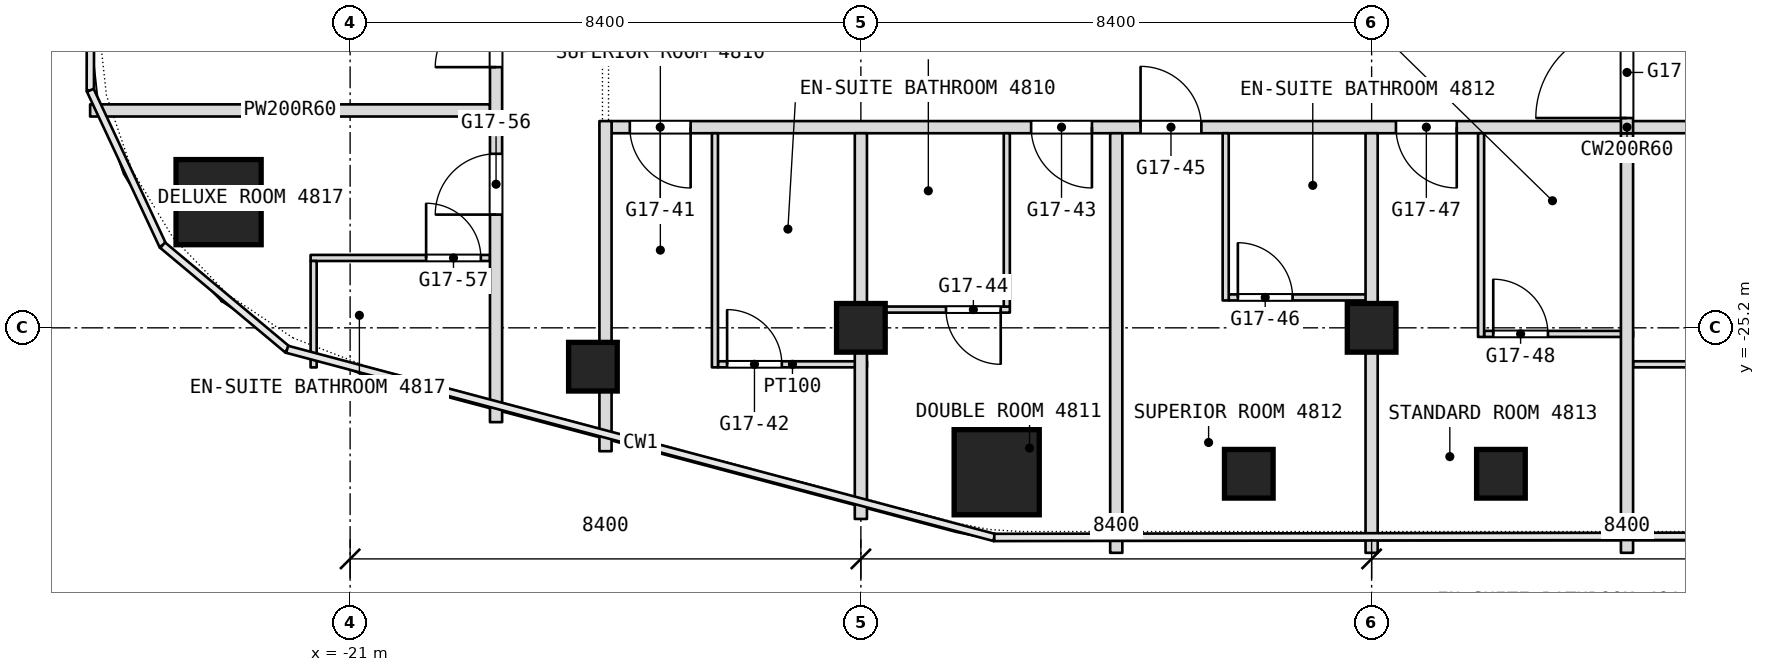
"""IFC4 building model, lengths in metres.
Left out: names, types, materials, properties, quantities, classifications, styles, units other than length and angle.
Written with IfcOpenShell. Run it as: python <this file> out.ifc"""

import sys

from ifc_helpers import new_model, si_unit, direction, frame, frame_2d, origin, origin_2d, place, context, subcontext, project, spatial, rectangle, extrude, element, fill, save


model = new_model("IFC4")
c1 = context("Model", 3, precision=1e-05, world=origin(), true_north=direction((0.0, 1.0)))
c2 = subcontext(c1, "Body", "Model", "MODEL_VIEW")
j1 = project(units=[si_unit("LENGTHUNIT", "METRE"), si_unit("PLANEANGLEUNIT", "RADIAN")], contexts=[c1])
p1 = place(None, origin())
s1 = spatial("IfcSite", under=j1, at=p1, CompositionType="ELEMENT")
p2 = place(p1, origin())
s2 = spatial("IfcBuilding", under=s1, at=p2, CompositionType="ELEMENT")
p3 = place(p2, frame((0.0, 0.0, 209.3)))
s3 = spatial("IfcBuildingStorey", under=s2, at=p3, CompositionType="ELEMENT", Elevation=209.3)
for number, where, z_axis, x_axis in (
    (1, (-23.163, -23.133, 0.0), (0.0, 0.0, 1.0), (1.0, 0.0, 0.0)),
    (2, (-10.366, -27.575, 0.0), (0.0, 0.0, 1.0), (1.0, 0.0, 0.0)),
):
    element("IfcColumn", number, at=place(p3, frame(where, z_axis=z_axis, x_axis=x_axis)), inside=s3, PredefinedType="COLUMN", context=c2, shape_type="SweptSolid", body=[
        extrude(rectangle(XDim=1.4, YDim=1.4, at=origin_2d()), origin(), (0.0, 0.0, 1.0), 3.6),
    ])
for number, where, z_axis, x_axis in (
    (3, (-12.6, -25.2, 0.0), (0.0, 0.0, 1.0), (1.0, 0.0, 0.0)),
    (4, (-4.2, -25.2, 0.0), (0.0, 0.0, 1.0), (1.0, 0.0, 0.0)),
    (5, (-2.073, -27.6, 0.0), (0.0, 0.0, 1.0), (1.0, 0.0, 0.0)),
    (6, (-6.22, -27.6, 0.0), (0.0, 0.0, 1.0), (1.0, 0.0, 0.0)),
    (7, (-17.007, -25.839, 0.0), (0.0, 0.0, 1.0), (1.0, 0.0, 0.0)),
):
    element("IfcColumn", number, at=place(p3, frame(where, z_axis=z_axis, x_axis=x_axis)), inside=s3, PredefinedType="COLUMN", context=c2, shape_type="SweptSolid", body=[
        extrude(rectangle(XDim=0.8, YDim=0.8, at=origin_2d()), origin(), (0.0, 0.0, 1.0), 3.6),
    ])
p4 = place(p3, frame((-14.95, -25.8, 0.0), z_axis=(0.0, 0.0, 1.0), x_axis=(1.0, 0.0, 0.0)))
e8 = element("IfcWall", 8, at=p4, inside=s3, PredefinedType="PARTITIONING", context=c2, shape_type="SweptSolid", body=[
    extrude(rectangle(XDim=2.45, YDim=0.1, at=frame_2d((1.225, 0.0))), origin(), (0.0, 0.0, 1.0), 3.34),
])
p5 = place(p4, frame((0.15, 0.0, 0.0)))
e9 = element("IfcOpeningElement", 9, at=p5, cuts=e8, PredefinedType="OPENING", context=c2, shape_type="SweptSolid", body=[
    extrude(rectangle(XDim=0.9, YDim=2.1, at=frame_2d((0.45, 1.05))), frame((0.0, 0.05, 0.0), z_axis=(0.0, -1.0, 0.0), x_axis=(1.0, 0.0, 0.0)), (0.0, 0.0, 1.0), 0.1),
])
p6 = place(p3, frame((0.1, -25.8, 0.0), z_axis=(0.0, 0.0, 1.0), x_axis=(1.0, 0.0, 0.0)))
e10 = element("IfcWall", 10, at=p6, inside=s3, PredefinedType="PARTITIONING", context=c2, shape_type="SweptSolid", body=[
    extrude(rectangle(XDim=2.35, YDim=0.1, at=frame_2d((1.175, 0.0))), origin(), (0.0, 0.0, 1.0), 3.34),
])
p7 = place(p6, frame((1.3, 0.0, 0.0)))
e11 = element("IfcOpeningElement", 11, at=p7, cuts=e10, PredefinedType="OPENING", context=c2, shape_type="SweptSolid", body=[
    extrude(rectangle(XDim=0.9, YDim=2.1, at=frame_2d((0.45, 1.05))), frame((0.0, 0.05, 0.0), z_axis=(0.0, -1.0, 0.0), x_axis=(1.0, 0.0, 0.0)), (0.0, 0.0, 1.0), 0.1),
])
p8 = place(p3, frame((-2.35, -25.3, 0.0), z_axis=(0.0, 0.0, 1.0), x_axis=(1.0, 0.0, 0.0)))
e12 = element("IfcWall", 12, at=p8, inside=s3, PredefinedType="PARTITIONING", context=c2, shape_type="SweptSolid", body=[
    extrude(rectangle(XDim=2.45, YDim=0.1, at=frame_2d((1.225, 0.0))), origin(), (0.0, 0.0, 1.0), 2.94),
])
p9 = place(p8, frame((0.15, 0.0, 0.0)))
e13 = element("IfcOpeningElement", 13, at=p9, cuts=e12, PredefinedType="OPENING", context=c2, shape_type="SweptSolid", body=[
    extrude(rectangle(XDim=0.9, YDim=2.1, at=frame_2d((0.45, 1.05))), frame((0.0, 0.05, 0.0), z_axis=(0.0, -1.0, 0.0), x_axis=(1.0, 0.0, 0.0)), (0.0, 0.0, 1.0), 0.1),
])
p10 = place(p3, frame((-12.5, -24.9, 0.0), z_axis=(0.0, 0.0, 1.0), x_axis=(1.0, 0.0, 0.0)))
e14 = element("IfcWall", 14, at=p10, inside=s3, PredefinedType="PARTITIONING", context=c2, shape_type="SweptSolid", body=[
    extrude(rectangle(XDim=2.35, YDim=0.1, at=frame_2d((1.175, 0.0))), origin(), (0.0, 0.0, 1.0), 3.34),
])
p11 = place(p10, frame((1.3, 0.0, 0.0)))
e15 = element("IfcOpeningElement", 15, at=p11, cuts=e14, PredefinedType="OPENING", context=c2, shape_type="SweptSolid", body=[
    extrude(rectangle(XDim=0.9, YDim=2.1, at=frame_2d((0.45, 1.05))), frame((0.0, 0.05, 0.0), z_axis=(0.0, -1.0, 0.0), x_axis=(1.0, 0.0, 0.0)), (0.0, 0.0, 1.0), 0.1),
])
p12 = place(p3, frame((-6.55, -24.7, 0.0), z_axis=(0.0, 0.0, 1.0), x_axis=(1.0, 0.0, 0.0)))
e16 = element("IfcWall", 16, at=p12, inside=s3, PredefinedType="PARTITIONING", context=c2, shape_type="SweptSolid", body=[
    extrude(rectangle(XDim=2.45, YDim=0.1, at=frame_2d((1.225, 0.0))), origin(), (0.0, 0.0, 1.0), 3.34),
])
p13 = place(p12, frame((0.15, 0.0, 0.0)))
e17 = element("IfcOpeningElement", 17, at=p13, cuts=e16, PredefinedType="OPENING", context=c2, shape_type="SweptSolid", body=[
    extrude(rectangle(XDim=0.9, YDim=2.1, at=frame_2d((0.45, 1.05))), frame((0.0, 0.05, 0.0), z_axis=(0.0, -1.0, 0.0), x_axis=(1.0, 0.0, 0.0)), (0.0, 0.0, 1.0), 0.1),
])
p14 = place(p3, frame((-21.65, -24.051, 0.0), z_axis=(0.0, 0.0, 1.0), x_axis=(1.0, 0.0, 0.0)))
e18 = element("IfcWall", 18, at=p14, inside=s3, PredefinedType="PARTITIONING", context=c2, shape_type="SweptSolid", body=[
    extrude(rectangle(XDim=2.95, YDim=0.1, at=frame_2d((1.475, 0.0))), origin(), (0.0, 0.0, 1.0), 3.34),
])
p15 = place(p14, frame((1.9, 0.0, 0.0)))
e19 = element("IfcOpeningElement", 19, at=p15, cuts=e18, PredefinedType="OPENING", context=c2, shape_type="SweptSolid", body=[
    extrude(rectangle(XDim=0.9, YDim=2.1, at=frame_2d((0.45, 1.05))), frame((0.0, 0.05, 0.0), z_axis=(0.0, -1.0, 0.0), x_axis=(1.0, 0.0, 0.0)), (0.0, 0.0, 1.0), 0.1),
])
p16 = place(p3, frame((-16.7, -21.9, 0.0), z_axis=(0.0, 0.0, 1.0), x_axis=(1.0, 0.0, 0.0)))
e20 = element("IfcWall", 20, at=p16, inside=s3, PredefinedType="PARTITIONING", context=c2, shape_type="SweptSolid", body=[
    extrude(rectangle(XDim=33.4, YDim=0.2, at=frame_2d((16.7, 0.0))), origin(), (0.0, 0.0, 1.0), 3.34),
])
p17 = place(p16, frame((0.3, 0.0, 0.0)))
e21 = element("IfcOpeningElement", 21, at=p17, cuts=e20, PredefinedType="OPENING", context=c2, shape_type="SweptSolid", body=[
    extrude(rectangle(XDim=1.0, YDim=2.1, at=frame_2d((0.5, 1.05))), frame((0.0, 0.1, 0.0), z_axis=(0.0, -1.0, 0.0), x_axis=(1.0, 0.0, 0.0)), (0.0, 0.0, 1.0), 0.2),
])
p18 = place(p16, frame((6.9, 0.0, 0.0)))
e22 = element("IfcOpeningElement", 22, at=p18, cuts=e20, PredefinedType="OPENING", context=c2, shape_type="SweptSolid", body=[
    extrude(rectangle(XDim=1.0, YDim=2.1, at=frame_2d((0.5, 1.05))), frame((0.0, 0.1, 0.0), z_axis=(0.0, -1.0, 0.0), x_axis=(1.0, 0.0, 0.0)), (0.0, 0.0, 1.0), 0.2),
])
p19 = place(p16, frame((8.7, 0.0, 0.0)))
e23 = element("IfcOpeningElement", 23, at=p19, cuts=e20, PredefinedType="OPENING", context=c2, shape_type="SweptSolid", body=[
    extrude(rectangle(XDim=1.0, YDim=2.1, at=frame_2d((0.5, 1.05))), frame((0.0, 0.1, 0.0), z_axis=(0.0, -1.0, 0.0), x_axis=(1.0, 0.0, 0.0)), (0.0, 0.0, 1.0), 0.2),
])
p20 = place(p16, frame((12.9, 0.0, 0.0)))
e24 = element("IfcOpeningElement", 24, at=p20, cuts=e20, PredefinedType="OPENING", context=c2, shape_type="SweptSolid", body=[
    extrude(rectangle(XDim=1.0, YDim=2.1, at=frame_2d((0.5, 1.05))), frame((0.0, 0.1, 0.0), z_axis=(0.0, -1.0, 0.0), x_axis=(1.0, 0.0, 0.0)), (0.0, 0.0, 1.0), 0.2),
])
p21 = place(p16, frame((19.5, 0.0, 0.0)))
e25 = element("IfcOpeningElement", 25, at=p21, cuts=e20, PredefinedType="OPENING", context=c2, shape_type="SweptSolid", body=[
    extrude(rectangle(XDim=1.0, YDim=2.1, at=frame_2d((0.5, 1.05))), frame((0.0, 0.1, 0.0), z_axis=(0.0, -1.0, 0.0), x_axis=(1.0, 0.0, 0.0)), (0.0, 0.0, 1.0), 0.2),
])
p22 = place(p16, frame((24.6, 0.0, 0.0)))
e26 = element("IfcOpeningElement", 26, at=p22, cuts=e20, PredefinedType="OPENING", context=c2, shape_type="SweptSolid", body=[
    extrude(rectangle(XDim=1.1, YDim=2.1, at=frame_2d((0.55, 1.05))), frame((0.0, 0.1, 0.0), z_axis=(0.0, -1.0, 0.0), x_axis=(1.0, 0.0, 0.0)), (0.0, 0.0, 1.0), 0.2),
])
p23 = place(p16, frame((29.7, 0.0, 0.0)))
e27 = element("IfcOpeningElement", 27, at=p23, cuts=e20, PredefinedType="OPENING", context=c2, shape_type="SweptSolid", body=[
    extrude(rectangle(XDim=1.0, YDim=2.1, at=frame_2d((0.5, 1.05))), frame((0.0, 0.1, 0.0), z_axis=(0.0, -1.0, 0.0), x_axis=(1.0, 0.0, 0.0)), (0.0, 0.0, 1.0), 0.2),
])
p24 = place(p3, frame((-25.276, -21.625, 0.0), z_axis=(0.0, 0.0, 1.0), x_axis=(1.0, 0.0, 0.0)))
e28 = element("IfcWall", 28, at=p24, inside=s3, PredefinedType="PARTITIONING", context=c2, shape_type="SweptSolid", body=[
    extrude(rectangle(XDim=6.576, YDim=0.2, at=frame_2d((3.288, 0.0))), origin(), (0.0, 0.0, 1.0), 3.34),
])
p25 = place(p3, frame((0.0, -28.9, 0.0), z_axis=(0.0, 0.0, 1.0), x_axis=(0.0, 1.0, 0.0)))
e29 = element("IfcWall", 29, at=p25, inside=s3, PredefinedType="PARTITIONING", context=c2, shape_type="SweptSolid", body=[
    extrude(rectangle(XDim=6.9, YDim=0.2, at=frame_2d((3.45, 0.0))), origin(), (0.0, 0.0, 1.0), 3.34),
])
p26 = place(p3, frame((0.0, -22.0, 0.0), z_axis=(0.0, 0.0, 1.0), x_axis=(0.0, 1.0, 0.0)))
e30 = element("IfcWall", 30, at=p26, inside=s3, PredefinedType="PARTITIONING", context=c2, shape_type="SweptSolid", body=[
    extrude(rectangle(XDim=8.4, YDim=0.2, at=frame_2d((4.2, 0.0))), origin(), (0.0, 0.0, 1.0), 3.34),
])
p27 = place(p26, frame((0.25, 0.0, 0.0)))
e31 = element("IfcOpeningElement", 31, at=p27, cuts=e30, PredefinedType="OPENING", context=c2, shape_type="SweptSolid", body=[
    extrude(rectangle(XDim=1.5, YDim=2.1, at=frame_2d((0.75, 1.05))), frame((0.0, 0.1, 0.0), z_axis=(0.0, -1.0, 0.0), x_axis=(1.0, 0.0, 0.0)), (0.0, 0.0, 1.0), 0.2),
])
p28 = place(p3, frame((-2.4, -25.35, 0.0), z_axis=(0.0, 0.0, 1.0), x_axis=(0.0, 1.0, 0.0)))
e32 = element("IfcWall", 32, at=p28, inside=s3, PredefinedType="PARTITIONING", context=c2, shape_type="SweptSolid", body=[
    extrude(rectangle(XDim=3.35, YDim=0.1, at=frame_2d((1.675, 0.0))), origin(), (0.0, 0.0, 1.0), 3.34),
])
p29 = place(p3, frame((-4.2, -28.9, 0.0), z_axis=(0.0, 0.0, 1.0), x_axis=(0.0, 1.0, 0.0)))
e33 = element("IfcWall", 33, at=p29, inside=s3, PredefinedType="PARTITIONING", context=c2, shape_type="SweptSolid", body=[
    extrude(rectangle(XDim=6.9, YDim=0.2, at=frame_2d((3.45, 0.0))), origin(), (0.0, 0.0, 1.0), 3.34),
])
p30 = place(p3, frame((-6.6, -24.75, 0.0), z_axis=(0.0, 0.0, 1.0), x_axis=(0.0, 1.0, 0.0)))
e34 = element("IfcWall", 34, at=p30, inside=s3, PredefinedType="PARTITIONING", context=c2, shape_type="SweptSolid", body=[
    extrude(rectangle(XDim=2.75, YDim=0.1, at=frame_2d((1.375, 0.0))), origin(), (0.0, 0.0, 1.0), 3.34),
])
p31 = place(p3, frame((-8.4, -28.9, 0.0), z_axis=(0.0, 0.0, 1.0), x_axis=(0.0, 1.0, 0.0)))
e35 = element("IfcWall", 35, at=p31, inside=s3, PredefinedType="PARTITIONING", context=c2, shape_type="SweptSolid", body=[
    extrude(rectangle(XDim=6.9, YDim=0.2, at=frame_2d((3.45, 0.0))), origin(), (0.0, 0.0, 1.0), 3.34),
])
p32 = place(p3, frame((-10.2, -24.85, 0.0), z_axis=(0.0, 0.0, 1.0), x_axis=(0.0, 1.0, 0.0)))
e36 = element("IfcWall", 36, at=p32, inside=s3, PredefinedType="PARTITIONING", context=c2, shape_type="SweptSolid", body=[
    extrude(rectangle(XDim=2.85, YDim=0.1, at=frame_2d((1.425, 0.0))), origin(), (0.0, 0.0, 1.0), 3.34),
])
p33 = place(p3, frame((-12.6, -28.343, 0.0), z_axis=(0.0, 0.0, 1.0), x_axis=(0.0, 1.0, 0.0)))
e37 = element("IfcWall", 37, at=p33, inside=s3, PredefinedType="PARTITIONING", context=c2, shape_type="SweptSolid", body=[
    extrude(rectangle(XDim=6.343, YDim=0.2, at=frame_2d((3.171, 0.0))), origin(), (0.0, 0.0, 1.0), 3.34),
])
p34 = place(p3, frame((-15.0, -25.85, 0.0), z_axis=(0.0, 0.0, 1.0), x_axis=(0.0, 1.0, 0.0)))
e38 = element("IfcWall", 38, at=p34, inside=s3, PredefinedType="PARTITIONING", context=c2, shape_type="SweptSolid", body=[
    extrude(rectangle(XDim=3.85, YDim=0.1, at=frame_2d((1.925, 0.0))), origin(), (0.0, 0.0, 1.0), 3.34),
])
p35 = place(p3, frame((-16.8, -27.229, 0.0), z_axis=(0.0, 0.0, 1.0), x_axis=(0.0, 1.0, 0.0)))
e39 = element("IfcWall", 39, at=p35, inside=s3, PredefinedType="PARTITIONING", context=c2, shape_type="SweptSolid", body=[
    extrude(rectangle(XDim=5.429, YDim=0.2, at=frame_2d((2.714, 0.0))), origin(), (0.0, 0.0, 1.0), 3.34),
])
p36 = place(p3, frame((-18.6, -26.751, 0.0), z_axis=(0.0, 0.0, 1.0), x_axis=(0.0, 1.0, 0.0)))
e40 = element("IfcWall", 40, at=p36, inside=s3, PredefinedType="PARTITIONING", context=c2, shape_type="SweptSolid", body=[
    extrude(rectangle(XDim=49.091, YDim=0.2, at=frame_2d((24.545, 0.0))), origin(), (0.0, 0.0, 1.0), 3.34),
])
p37 = place(p36, frame((3.413, 0.0, 0.0)))
e41 = element("IfcOpeningElement", 41, at=p37, cuts=e40, PredefinedType="OPENING", context=c2, shape_type="SweptSolid", body=[
    extrude(rectangle(XDim=1.0, YDim=2.1, at=frame_2d((0.5, 1.05))), frame((0.0, 0.1, 0.0), z_axis=(0.0, -1.0, 0.0), x_axis=(1.0, 0.0, 0.0)), (0.0, 0.0, 1.0), 0.2),
])
p38 = place(p36, frame((5.838, 0.0, 0.0)))
e42 = element("IfcOpeningElement", 42, at=p38, cuts=e40, PredefinedType="OPENING", context=c2, shape_type="SweptSolid", body=[
    extrude(rectangle(XDim=1.0, YDim=2.1, at=frame_2d((0.5, 1.05))), frame((0.0, 0.1, 0.0), z_axis=(0.0, -1.0, 0.0), x_axis=(1.0, 0.0, 0.0)), (0.0, 0.0, 1.0), 0.2),
])
p39 = place(p36, frame((13.551, 0.0, 0.0)))
e43 = element("IfcOpeningElement", 43, at=p39, cuts=e40, PredefinedType="OPENING", context=c2, shape_type="SweptSolid", body=[
    extrude(rectangle(XDim=1.1, YDim=2.1, at=frame_2d((0.55, 1.05))), frame((0.0, 0.1, 0.0), z_axis=(0.0, -1.0, 0.0), x_axis=(1.0, 0.0, 0.0)), (0.0, 0.0, 1.0), 0.2),
])
p40 = place(p36, frame((21.151, 0.0, 0.0)))
e44 = element("IfcOpeningElement", 44, at=p40, cuts=e40, PredefinedType="OPENING", context=c2, shape_type="SweptSolid", body=[
    extrude(rectangle(XDim=1.0, YDim=2.1, at=frame_2d((0.5, 1.05))), frame((0.0, 0.1, 0.0), z_axis=(0.0, -1.0, 0.0), x_axis=(1.0, 0.0, 0.0)), (0.0, 0.0, 1.0), 0.2),
])
p41 = place(p36, frame((22.951, 0.0, 0.0)))
e45 = element("IfcOpeningElement", 45, at=p41, cuts=e40, PredefinedType="OPENING", context=c2, shape_type="SweptSolid", body=[
    extrude(rectangle(XDim=1.0, YDim=2.1, at=frame_2d((0.5, 1.05))), frame((0.0, 0.1, 0.0), z_axis=(0.0, -1.0, 0.0), x_axis=(1.0, 0.0, 0.0)), (0.0, 0.0, 1.0), 0.2),
])
p42 = place(p36, frame((28.301, 0.0, 0.0)))
e46 = element("IfcOpeningElement", 46, at=p42, cuts=e40, PredefinedType="OPENING", context=c2, shape_type="SweptSolid", body=[
    extrude(rectangle(XDim=1.1, YDim=2.1, at=frame_2d((0.55, 1.05))), frame((0.0, 0.1, 0.0), z_axis=(0.0, -1.0, 0.0), x_axis=(1.0, 0.0, 0.0)), (0.0, 0.0, 1.0), 0.2),
])
p43 = place(p36, frame((38.851, 0.0, 0.0)))
e47 = element("IfcOpeningElement", 47, at=p43, cuts=e40, PredefinedType="OPENING", context=c2, shape_type="SweptSolid", body=[
    extrude(rectangle(XDim=1.1, YDim=2.1, at=frame_2d((0.55, 1.05))), frame((0.0, 0.1, 0.0), z_axis=(0.0, -1.0, 0.0), x_axis=(1.0, 0.0, 0.0)), (0.0, 0.0, 1.0), 0.2),
])
p44 = place(p36, frame((44.051, 0.0, 0.0)))
e48 = element("IfcOpeningElement", 48, at=p44, cuts=e40, PredefinedType="OPENING", context=c2, shape_type="SweptSolid", body=[
    extrude(rectangle(XDim=1.0, YDim=2.1, at=frame_2d((0.5, 1.05))), frame((0.0, 0.1, 0.0), z_axis=(0.0, -1.0, 0.0), x_axis=(1.0, 0.0, 0.0)), (0.0, 0.0, 1.0), 0.2),
])
p45 = place(p3, frame((-21.6, -25.851, 0.0), z_axis=(0.0, 0.0, 1.0), x_axis=(0.0, 1.0, 0.0)))
e49 = element("IfcWall", 49, at=p45, inside=s3, PredefinedType="PARTITIONING", context=c2, shape_type="SweptSolid", body=[
    extrude(rectangle(XDim=1.75, YDim=0.1, at=frame_2d((0.875, 0.0))), origin(), (0.0, 0.0, 1.0), 3.34),
])
p46 = place(p5, origin())
e50 = element("IfcDoor", 50, at=p46, inside=s3, OperationType="SINGLE_SWING_LEFT", PredefinedType="DOOR", context=c2, shape_type="SweptSolid", body=[
    extrude(rectangle(XDim=0.9, YDim=2.1, at=frame_2d((0.45, 1.05))), frame((0.0, 0.025, 0.0), z_axis=(0.0, -1.0, 0.0), x_axis=(1.0, 0.0, 0.0)), (0.0, 0.0, 1.0), 0.05),
])
fill(e9, e50)
p47 = place(p9, origin())
e51 = element("IfcDoor", 51, at=p47, inside=s3, OperationType="SINGLE_SWING_LEFT", PredefinedType="DOOR", context=c2, shape_type="SweptSolid", body=[
    extrude(rectangle(XDim=0.9, YDim=2.1, at=frame_2d((0.45, 1.05))), frame((0.0, 0.025, 0.0), z_axis=(0.0, -1.0, 0.0), x_axis=(1.0, 0.0, 0.0)), (0.0, 0.0, 1.0), 0.05),
])
fill(e13, e51)
p48 = place(p11, origin())
e52 = element("IfcDoor", 52, at=p48, inside=s3, OperationType="SINGLE_SWING_RIGHT", PredefinedType="DOOR", context=c2, shape_type="SweptSolid", body=[
    extrude(rectangle(XDim=0.9, YDim=2.1, at=frame_2d((0.45, 1.05))), frame((0.0, 0.025, 0.0), z_axis=(0.0, -1.0, 0.0), x_axis=(1.0, 0.0, 0.0)), (0.0, 0.0, 1.0), 0.05),
])
fill(e15, e52)
p49 = place(p13, origin())
e53 = element("IfcDoor", 53, at=p49, inside=s3, OperationType="SINGLE_SWING_LEFT", PredefinedType="DOOR", context=c2, shape_type="SweptSolid", body=[
    extrude(rectangle(XDim=0.9, YDim=2.1, at=frame_2d((0.45, 1.05))), frame((0.0, 0.025, 0.0), z_axis=(0.0, -1.0, 0.0), x_axis=(1.0, 0.0, 0.0)), (0.0, 0.0, 1.0), 0.05),
])
fill(e17, e53)
p50 = place(p15, origin())
e54 = element("IfcDoor", 54, at=p50, inside=s3, OperationType="SINGLE_SWING_LEFT", PredefinedType="DOOR", context=c2, shape_type="SweptSolid", body=[
    extrude(rectangle(XDim=0.9, YDim=2.1, at=frame_2d((0.45, 1.05))), frame((0.0, 0.025, 0.0), z_axis=(0.0, -1.0, 0.0), x_axis=(1.0, 0.0, 0.0)), (0.0, 0.0, 1.0), 0.05),
])
fill(e19, e54)
p51 = place(p17, origin())
e55 = element("IfcDoor", 55, at=p51, inside=s3, OperationType="SINGLE_SWING_RIGHT", PredefinedType="DOOR", context=c2, shape_type="SweptSolid", body=[
    extrude(rectangle(XDim=1.0, YDim=2.1, at=frame_2d((0.5, 1.05))), frame((0.0, 0.025, 0.0), z_axis=(0.0, -1.0, 0.0), x_axis=(1.0, 0.0, 0.0)), (0.0, 0.0, 1.0), 0.05),
])
fill(e21, e55)
p52 = place(p18, origin())
e56 = element("IfcDoor", 56, at=p52, inside=s3, OperationType="SINGLE_SWING_LEFT", PredefinedType="DOOR", context=c2, shape_type="SweptSolid", body=[
    extrude(rectangle(XDim=1.0, YDim=2.1, at=frame_2d((0.5, 1.05))), frame((0.0, 0.025, 0.0), z_axis=(0.0, -1.0, 0.0), x_axis=(1.0, 0.0, 0.0)), (0.0, 0.0, 1.0), 0.05),
])
fill(e22, e56)
p53 = place(p19, origin())
e57 = element("IfcDoor", 57, at=p53, inside=s3, OperationType="SINGLE_SWING_LEFT", PredefinedType="DOOR", context=c2, shape_type="SweptSolid", body=[
    extrude(rectangle(XDim=1.0, YDim=2.1, at=frame_2d((0.5, 1.05))), frame((0.0, 0.025, 0.0), z_axis=(0.0, -1.0, 0.0), x_axis=(1.0, 0.0, 0.0)), (0.0, 0.0, 1.0), 0.05),
])
fill(e23, e57)
p54 = place(p20, origin())
e58 = element("IfcDoor", 58, at=p54, inside=s3, OperationType="SINGLE_SWING_LEFT", PredefinedType="DOOR", context=c2, shape_type="SweptSolid", body=[
    extrude(rectangle(XDim=1.0, YDim=2.1, at=frame_2d((0.5, 1.05))), frame((0.0, 0.025, 0.0), z_axis=(0.0, -1.0, 0.0), x_axis=(1.0, 0.0, 0.0)), (0.0, 0.0, 1.0), 0.05),
])
fill(e24, e58)
p55 = place(p37, origin())
e59 = element("IfcDoor", 59, at=p55, inside=s3, OperationType="SINGLE_SWING_LEFT", PredefinedType="DOOR", context=c2, shape_type="SweptSolid", body=[
    extrude(rectangle(XDim=1.0, YDim=2.1, at=frame_2d((0.5, 1.05))), frame((0.0, 0.025, 0.0), z_axis=(0.0, -1.0, 0.0), x_axis=(1.0, 0.0, 0.0)), (0.0, 0.0, 1.0), 0.05),
])
fill(e41, e59)
p56 = place(p38, origin())
e60 = element("IfcDoor", 60, at=p56, inside=s3, OperationType="SINGLE_SWING_LEFT", PredefinedType="DOOR", context=c2, shape_type="SweptSolid", body=[
    extrude(rectangle(XDim=1.0, YDim=2.1, at=frame_2d((0.5, 1.05))), frame((0.0, 0.025, 0.0), z_axis=(0.0, -1.0, 0.0), x_axis=(1.0, 0.0, 0.0)), (0.0, 0.0, 1.0), 0.05),
])
fill(e42, e60)
p57 = place(p27, origin())
e61 = element("IfcDoor", 61, at=p57, inside=s3, OperationType="DOUBLE_DOOR_DOUBLE_SWING", PredefinedType="DOOR", context=c2, shape_type="SweptSolid", body=[
    extrude(rectangle(XDim=1.5, YDim=2.1, at=frame_2d((0.75, 1.05))), frame((0.0, 0.025, 0.0), z_axis=(0.0, -1.0, 0.0), x_axis=(1.0, 0.0, 0.0)), (0.0, 0.0, 1.0), 0.05),
])
fill(e31, e61)
save(model, sys.argv[1])
